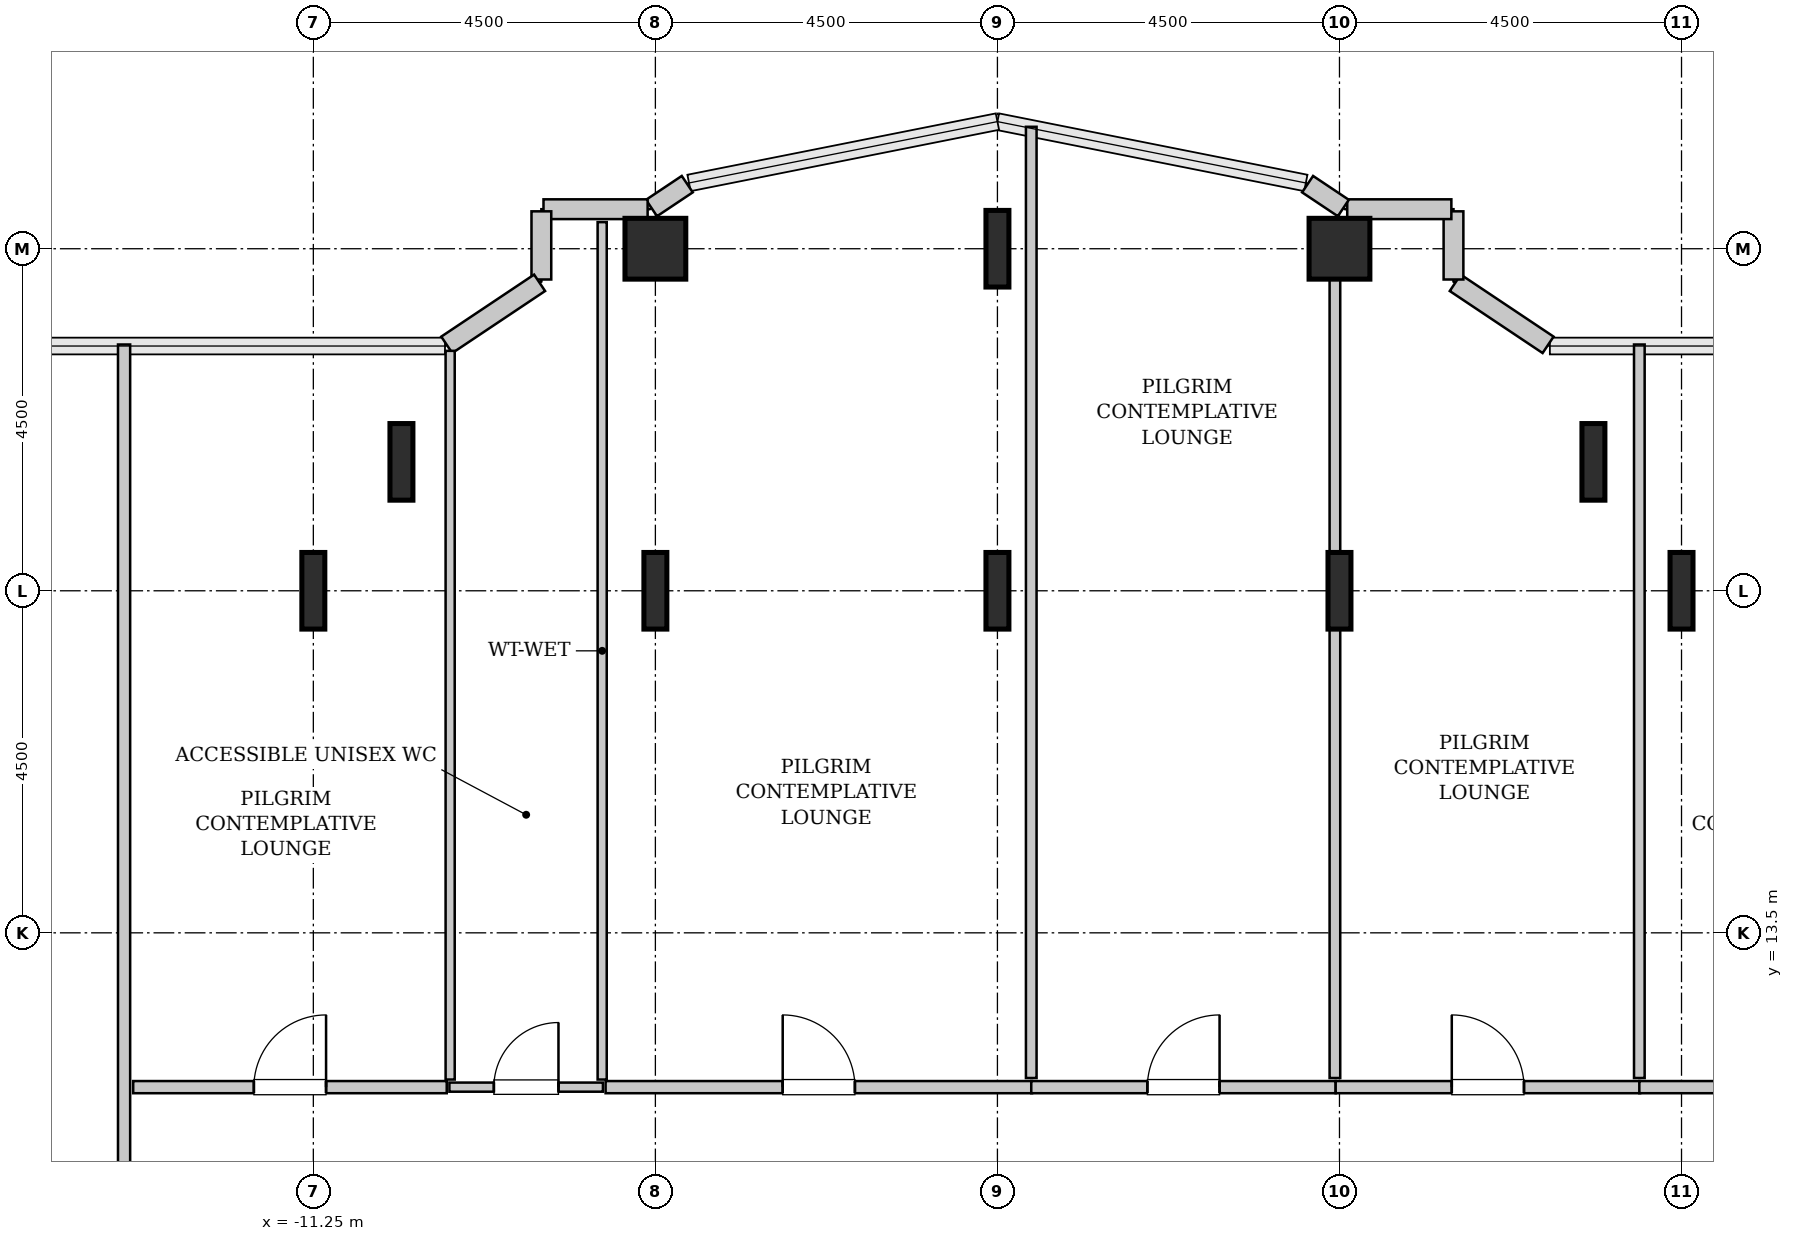
"""IFC4 building model, lengths in metres.
Left out: names, types, materials, properties, quantities, classifications, styles, units other than length and angle.
Written with IfcOpenShell. Run it as: python <this file> out.ifc"""

import sys

from ifc_helpers import new_model, si_unit, direction, frame, frame_2d, origin, origin_2d, place, context, subcontext, project, spatial, rectangle, hollow_rectangle, i_section, extrude, source, transform, mapped, element, fill, save


model = new_model("IFC4")
c1 = context("Model", 3, precision=1e-05, world=origin(), true_north=direction((0.0, 1.0)))
c2 = subcontext(c1, "Body", "Model", "MODEL_VIEW")
j1 = project(units=[si_unit("LENGTHUNIT", "METRE"), si_unit("PLANEANGLEUNIT", "RADIAN")], contexts=[c1])
p1 = place(None, origin())
s1 = spatial("IfcSite", under=j1, at=p1, CompositionType="ELEMENT")
p2 = place(p1, origin())
s2 = spatial("IfcBuilding", under=s1, at=p2, CompositionType="ELEMENT")
p3 = place(p2, frame((0.0, 0.0, 121.2)))
s3 = spatial("IfcBuildingStorey", under=s2, at=p3, CompositionType="ELEMENT", Elevation=121.2)
m1 = source(origin(), c2, "Body", "SweptSolid", [
    extrude(i_section(OverallWidth=0.302, OverallDepth=1.008, WebThickness=0.021, FlangeThickness=0.04, FilletRadius=0.03, at=origin_2d()), origin(), (0.0, 0.0, 1.0), 3.8),
])
for number, where, z_axis, x_axis in (
    (1, (-11.25, 18.0, 0.0), (0.0, 0.0, 1.0), (1.0, 0.0, 0.0)),
    (2, (-10.091, 19.696, 0.0), (0.0, 0.0, 1.0), (1.0, 0.0, 0.0)),
    (3, (-6.75, 18.0, 0.0), (0.0, 0.0, 1.0), (1.0, 0.0, 0.0)),
):
    element("IfcColumn", number, at=place(p3, frame(where, z_axis=z_axis, x_axis=x_axis)), inside=s3, PredefinedType="COLUMN", context=c2, shape_type="MappedRepresentation", body=[
        mapped(m1, transform((0.0, 0.0, 0.0), x_axis=(1.0, 0.0, 0.0), y_axis=(0.0, 1.0, 0.0), z_axis=(0.0, 0.0, 1.0), scale=1.0)),
    ])
m2 = source(origin(), c2, "Body", "SweptSolid", [
    extrude(hollow_rectangle(XDim=0.8, YDim=0.8, WallThickness=0.04, InnerFilletRadius=0.04, OuterFilletRadius=0.08, at=origin_2d()), origin(), (0.0, 0.0, 1.0), 3.8),
])
p4 = place(p3, frame((-6.75, 22.5, 0.0), z_axis=(0.0, 0.0, 1.0), x_axis=(1.0, 0.0, 0.0)))
e4 = element("IfcColumn", 4, at=p4, inside=s3, PredefinedType="COLUMN", context=c2, shape_type="MappedRepresentation", body=[
    mapped(m2, transform((0.0, 0.0, 0.0), x_axis=(1.0, 0.0, 0.0), y_axis=(0.0, 1.0, 0.0), z_axis=(0.0, 0.0, 1.0), scale=1.0)),
])
for number, where, z_axis, x_axis in (
    (5, (-2.25, 18.0, 0.0), (0.0, 0.0, 1.0), (1.0, 0.0, 0.0)),
    (6, (-2.25, 22.5, 0.0), (0.0, 0.0, 1.0), (1.0, 0.0, 0.0)),
    (7, (2.25, 18.0, 0.0), (0.0, 0.0, 1.0), (1.0, 0.0, 0.0)),
):
    element("IfcColumn", number, at=place(p3, frame(where, z_axis=z_axis, x_axis=x_axis)), inside=s3, PredefinedType="COLUMN", context=c2, shape_type="MappedRepresentation", body=[
        mapped(m1, transform((0.0, 0.0, 0.0), x_axis=(1.0, 0.0, 0.0), y_axis=(0.0, 1.0, 0.0), z_axis=(0.0, 0.0, 1.0), scale=1.0)),
    ])
p5 = place(p3, frame((2.25, 22.5, 0.0), z_axis=(0.0, 0.0, 1.0), x_axis=(1.0, 0.0, 0.0)))
e8 = element("IfcColumn", 8, at=p5, inside=s3, PredefinedType="COLUMN", context=c2, shape_type="MappedRepresentation", body=[
    mapped(m2, transform((0.0, 0.0, 0.0), x_axis=(1.0, 0.0, 0.0), y_axis=(0.0, 1.0, 0.0), z_axis=(0.0, 0.0, 1.0), scale=1.0)),
])
for number, where, z_axis, x_axis in (
    (9, (5.591, 19.696, 0.0), (0.0, 0.0, 1.0), (1.0, 0.0, 0.0)),
    (10, (6.75, 18.0, 0.0), (0.0, 0.0, 1.0), (1.0, 0.0, 0.0)),
):
    element("IfcColumn", number, at=place(p3, frame(where, z_axis=z_axis, x_axis=x_axis)), inside=s3, PredefinedType="COLUMN", context=c2, shape_type="MappedRepresentation", body=[
        mapped(m1, transform((0.0, 0.0, 0.0), x_axis=(1.0, 0.0, 0.0), y_axis=(0.0, 1.0, 0.0), z_axis=(0.0, 0.0, 1.0), scale=1.0)),
    ])
m3 = source(origin(), c2, "Body", "SweptSolid", [
    extrude(rectangle(XDim=1.469, YDim=0.26, at=frame_2d((0.734, 0.0))), origin(), (0.0, 0.0, 1.0), 3.55),
])
p6 = place(p3, frame((4.995, 21.236, 0.0), z_axis=(0.0, 0.0, 1.0), x_axis=(-0.831461760506, 0.555581983884, 0.0)))
e11 = element("IfcWall", 11, at=p6, inside=s3, PredefinedType="SOLIDWALL", context=c2, shape_type="MappedRepresentation", body=[
    mapped(m3, transform((0.0, 0.0, 0.0), x_axis=(1.0, 0.0, 0.0), y_axis=(0.0, 1.0, 0.0), z_axis=(0.0, 0.0, 1.0), scale=1.0)),
])
m4 = source(origin(), c2, "Body", "SweptSolid", [
    extrude(rectangle(XDim=0.897, YDim=0.26, at=frame_2d((0.448, 0.0))), origin(), (0.0, 0.0, 1.0), 3.55),
])
p7 = place(p3, frame((3.75, 22.095, 0.0), z_axis=(0.0, 0.0, 1.0), x_axis=(0.0, 1.0, 0.0)))
e12 = element("IfcWall", 12, at=p7, inside=s3, PredefinedType="SOLIDWALL", context=c2, shape_type="MappedRepresentation", body=[
    mapped(m4, transform((0.0, 0.0, 0.0), x_axis=(1.0, 0.0, 0.0), y_axis=(0.0, 1.0, 0.0), z_axis=(0.0, 0.0, 1.0), scale=1.0)),
])
m5 = source(origin(), c2, "Body", "SweptSolid", [
    extrude(rectangle(XDim=1.37, YDim=0.26, at=frame_2d((0.685, 0.0))), origin(), (0.0, 0.0, 1.0), 3.55),
])
p8 = place(p3, frame((3.722, 23.02, 0.0), z_axis=(0.0, 0.0, 1.0), x_axis=(-1.0, 0.0, 0.0)))
e13 = element("IfcWall", 13, at=p8, inside=s3, PredefinedType="SOLIDWALL", context=c2, shape_type="MappedRepresentation", body=[
    mapped(m5, transform((0.0, 0.0, 0.0), x_axis=(1.0, 0.0, 0.0), y_axis=(0.0, 1.0, 0.0), z_axis=(0.0, 0.0, 1.0), scale=1.0)),
])
m6 = source(origin(), c2, "Body", "SweptSolid", [
    extrude(rectangle(XDim=0.565, YDim=0.26, at=frame_2d((0.283, 0.0))), origin(), (0.0, 0.0, 1.0), 3.55),
])
for number, where, z_axis, x_axis in (
    (14, (2.301, 23.036, 0.0), (0.0, 0.0, 1.0), (-0.832, 0.555, 0.0)),
    (15, (-6.331, 23.35, 0.0), (0.0, 0.0, 1.0), (-0.832, -0.555, 0.0)),
):
    element("IfcWall", number, at=place(p3, frame(where, z_axis=z_axis, x_axis=x_axis)), inside=s3, PredefinedType="SOLIDWALL", context=c2, shape_type="MappedRepresentation", body=[
        mapped(m6, transform((0.0, 0.0, 0.0), x_axis=(1.0, 0.0, 0.0), y_axis=(0.0, 1.0, 0.0), z_axis=(0.0, 0.0, 1.0), scale=1.0)),
    ])
p9 = place(p3, frame((-6.852, 23.02, 0.0), z_axis=(0.0, 0.0, 1.0), x_axis=(-1.0, 0.0, 0.0)))
e16 = element("IfcWall", 16, at=p9, inside=s3, PredefinedType="SOLIDWALL", context=c2, shape_type="MappedRepresentation", body=[
    mapped(m5, transform((0.0, 0.0, 0.0), x_axis=(1.0, 0.0, 0.0), y_axis=(0.0, 1.0, 0.0), z_axis=(0.0, 0.0, 1.0), scale=1.0)),
])
p10 = place(p3, frame((-8.25, 22.992, 0.0), z_axis=(0.0, 0.0, 1.0), x_axis=(0.0, -1.0, 0.0)))
e17 = element("IfcWall", 17, at=p10, inside=s3, PredefinedType="SOLIDWALL", context=c2, shape_type="MappedRepresentation", body=[
    mapped(m4, transform((0.0, 0.0, 0.0), x_axis=(1.0, 0.0, 0.0), y_axis=(0.0, 1.0, 0.0), z_axis=(0.0, 0.0, 1.0), scale=1.0)),
])
p11 = place(p3, frame((-8.273, 22.052, 0.0), z_axis=(0.0, 0.0, 1.0), x_axis=(-0.831461760506, -0.555581983884, 0.0)))
e18 = element("IfcWall", 18, at=p11, inside=s3, PredefinedType="SOLIDWALL", context=c2, shape_type="MappedRepresentation", body=[
    mapped(m3, transform((0.0, 0.0, 0.0), x_axis=(1.0, 0.0, 0.0), y_axis=(0.0, 1.0, 0.0), z_axis=(0.0, 0.0, 1.0), scale=1.0)),
])
m7 = source(origin(), c2, "Body", "SweptSolid", [
    extrude(rectangle(XDim=2.02, YDim=0.12, at=frame_2d((1.01, 0.0))), origin(), (0.0, 0.0, 1.0), 3.535),
])
p12 = place(p3, frame((-9.46, 11.47, 0.0), z_axis=(0.0, 0.0, 1.0), x_axis=(1.0, 0.0, 0.0)))
e19 = element("IfcWall", 19, at=p12, inside=s3, PredefinedType="PLUMBINGWALL", context=c2, shape_type="MappedRepresentation", body=[
    mapped(m7, transform((0.0, 0.0, 0.0), x_axis=(1.0, 0.0, 0.0), y_axis=(0.0, 1.0, 0.0), z_axis=(0.0, 0.0, 1.0), scale=1.0)),
])
p13 = place(p12, frame((0.585, 0.0, 0.0)))
e20 = element("IfcOpeningElement", 20, at=p13, cuts=e19, PredefinedType="OPENING", context=c2, shape_type="SweptSolid", body=[
    extrude(rectangle(XDim=0.85, YDim=2.1, at=frame_2d((0.425, 1.05))), frame((0.0, 0.07, 0.0), z_axis=(0.0, -1.0, 0.0), x_axis=(1.0, 0.0, 0.0)), (0.0, 0.0, 1.0), 0.14),
])
m8 = source(origin(), c2, "Body", "SweptSolid", [
    extrude(rectangle(XDim=11.28, YDim=0.12, at=frame_2d((5.64, 0.0))), origin(), (0.0, 0.0, 1.0), 3.535),
])
p14 = place(p3, frame((-7.45, 11.57, 0.0), z_axis=(0.0, 0.0, 1.0), x_axis=(0.0, 1.0, 0.0)))
e21 = element("IfcWall", 21, at=p14, inside=s3, PredefinedType="PLUMBINGWALL", context=c2, shape_type="MappedRepresentation", body=[
    mapped(m8, transform((0.0, 0.0, 0.0), x_axis=(1.0, 0.0, 0.0), y_axis=(0.0, 1.0, 0.0), z_axis=(0.0, 0.0, 1.0), scale=1.0)),
])
m9 = source(origin(), c2, "Body", "SweptSolid", [
    extrude(rectangle(XDim=9.587, YDim=0.12, at=frame_2d((4.793, 0.0))), origin(), (0.0, 0.0, 1.0), 3.535),
])
p15 = place(p3, frame((-9.45, 11.57, 0.0), z_axis=(0.0, 0.0, 1.0), x_axis=(0.0, 1.0, 0.0)))
e22 = element("IfcWall", 22, at=p15, inside=s3, PredefinedType="PLUMBINGWALL", context=c2, shape_type="MappedRepresentation", body=[
    mapped(m9, transform((0.0, 0.0, 0.0), x_axis=(1.0, 0.0, 0.0), y_axis=(0.0, 1.0, 0.0), z_axis=(0.0, 0.0, 1.0), scale=1.0)),
])
m10 = source(origin(), c2, "Body", "SweptSolid", [
    extrude(rectangle(XDim=12.745, YDim=0.16, at=frame_2d((6.373, 0.0))), origin(), (0.0, 0.0, 1.0), 3.535),
])
p16 = place(p3, frame((-13.74, 8.495, 0.0), z_axis=(0.0, 0.0, 1.0), x_axis=(0.0, 1.0, 0.0)))
e23 = element("IfcWall", 23, at=p16, inside=s3, PredefinedType="PARTITIONING", context=c2, shape_type="MappedRepresentation", body=[
    mapped(m10, transform((0.0, 0.0, 0.0), x_axis=(1.0, 0.0, 0.0), y_axis=(0.0, 1.0, 0.0), z_axis=(0.0, 0.0, 1.0), scale=1.0)),
])
p17 = place(p16, frame((1.032, 0.0, 0.0)))
e24 = element("IfcOpeningElement", 24, at=p17, cuts=e23, PredefinedType="OPENING", context=c2, shape_type="SweptSolid", body=[
    extrude(rectangle(XDim=0.95, YDim=2.1, at=frame_2d((0.475, 1.05))), frame((0.0, 0.09, 0.0), z_axis=(0.0, -1.0, 0.0), x_axis=(1.0, 0.0, 0.0)), (0.0, 0.0, 1.0), 0.18),
])
m11 = source(origin(), c2, "Body", "SweptSolid", [
    extrude(rectangle(XDim=4.125, YDim=0.16, at=frame_2d((2.062, 0.0))), origin(), (0.0, 0.0, 1.0), 3.535),
])
p18 = place(p3, frame((-13.62, 11.47, 0.0), z_axis=(0.0, 0.0, 1.0), x_axis=(1.0, 0.0, 0.0)))
e25 = element("IfcWall", 25, at=p18, inside=s3, PredefinedType="PARTITIONING", context=c2, shape_type="MappedRepresentation", body=[
    mapped(m11, transform((0.0, 0.0, 0.0), x_axis=(1.0, 0.0, 0.0), y_axis=(0.0, 1.0, 0.0), z_axis=(0.0, 0.0, 1.0), scale=1.0)),
])
p19 = place(p18, frame((1.587, 0.0, 0.0)))
e26 = element("IfcOpeningElement", 26, at=p19, cuts=e25, PredefinedType="OPENING", context=c2, shape_type="SweptSolid", body=[
    extrude(rectangle(XDim=0.95, YDim=2.1, at=frame_2d((0.475, 1.05))), frame((0.0, 0.09, 0.0), z_axis=(0.0, -1.0, 0.0), x_axis=(1.0, 0.0, 0.0)), (0.0, 0.0, 1.0), 0.18),
])
m12 = source(origin(), c2, "Body", "SweptSolid", [
    extrude(rectangle(XDim=5.61, YDim=0.16, at=frame_2d((2.805, 0.0))), origin(), (0.0, 0.0, 1.0), 3.535),
])
p20 = place(p3, frame((-7.405, 11.47, 0.0), z_axis=(0.0, 0.0, 1.0), x_axis=(1.0, 0.0, 0.0)))
e27 = element("IfcWall", 27, at=p20, inside=s3, PredefinedType="PARTITIONING", context=c2, shape_type="MappedRepresentation", body=[
    mapped(m12, transform((0.0, 0.0, 0.0), x_axis=(1.0, 0.0, 0.0), y_axis=(0.0, 1.0, 0.0), z_axis=(0.0, 0.0, 1.0), scale=1.0)),
])
p21 = place(p20, frame((2.33, 0.0, 0.0)))
e28 = element("IfcOpeningElement", 28, at=p21, cuts=e27, PredefinedType="OPENING", context=c2, shape_type="SweptSolid", body=[
    extrude(rectangle(XDim=0.95, YDim=2.1, at=frame_2d((0.475, 1.05))), frame((0.0, 0.09, 0.0), z_axis=(0.0, -1.0, 0.0), x_axis=(1.0, 0.0, 0.0)), (0.0, 0.0, 1.0), 0.18),
])
m13 = source(origin(), c2, "Body", "SweptSolid", [
    extrude(rectangle(XDim=12.514, YDim=0.14, at=frame_2d((6.257, 0.0))), origin(), (0.0, 0.0, 1.0), 2.875),
])
p22 = place(p3, frame((-1.805, 11.59, 0.0), z_axis=(0.0, 0.0, 1.0), x_axis=(0.0, 1.0, 0.0)))
e29 = element("IfcWall", 29, at=p22, inside=s3, PredefinedType="PARTITIONING", context=c2, shape_type="MappedRepresentation", body=[
    mapped(m13, transform((0.0, 0.0, 0.0), x_axis=(1.0, 0.0, 0.0), y_axis=(0.0, 1.0, 0.0), z_axis=(0.0, 0.0, 1.0), scale=1.0)),
])
m14 = source(origin(), c2, "Body", "SweptSolid", [
    extrude(rectangle(XDim=4.005, YDim=0.16, at=frame_2d((2.002, 0.0))), origin(), (0.0, 0.0, 1.0), 3.535),
])
p23 = place(p3, frame((-1.805, 11.47, 0.0), z_axis=(0.0, 0.0, 1.0), x_axis=(1.0, 0.0, 0.0)))
e30 = element("IfcWall", 30, at=p23, inside=s3, PredefinedType="PARTITIONING", context=c2, shape_type="MappedRepresentation", body=[
    mapped(m14, transform((0.0, 0.0, 0.0), x_axis=(1.0, 0.0, 0.0), y_axis=(0.0, 1.0, 0.0), z_axis=(0.0, 0.0, 1.0), scale=1.0)),
])
p24 = place(p23, frame((1.528, 0.0, 0.0)))
e31 = element("IfcOpeningElement", 31, at=p24, cuts=e30, PredefinedType="OPENING", context=c2, shape_type="SweptSolid", body=[
    extrude(rectangle(XDim=0.95, YDim=2.1, at=frame_2d((0.475, 1.05))), frame((0.0, 0.09, 0.0), z_axis=(0.0, -1.0, 0.0), x_axis=(1.0, 0.0, 0.0)), (0.0, 0.0, 1.0), 0.18),
])
m15 = source(origin(), c2, "Body", "SweptSolid", [
    extrude(rectangle(XDim=11.318, YDim=0.14, at=frame_2d((5.659, 0.0))), origin(), (0.0, 0.0, 1.0), 2.875),
])
p25 = place(p3, frame((2.19, 11.59, 0.0), z_axis=(0.0, 0.0, 1.0), x_axis=(0.0, 1.0, 0.0)))
e32 = element("IfcWall", 32, at=p25, inside=s3, PredefinedType="PARTITIONING", context=c2, shape_type="MappedRepresentation", body=[
    mapped(m15, transform((0.0, 0.0, 0.0), x_axis=(1.0, 0.0, 0.0), y_axis=(0.0, 1.0, 0.0), z_axis=(0.0, 0.0, 1.0), scale=1.0)),
])
m16 = source(origin(), c2, "Body", "SweptSolid", [
    extrude(rectangle(XDim=4.005, YDim=0.16, at=frame_2d((2.002, 0.0))), origin(), (0.0, 0.0, 1.0), 3.535),
])
p26 = place(p3, frame((2.2, 11.47, 0.0), z_axis=(0.0, 0.0, 1.0), x_axis=(1.0, 0.0, 0.0)))
e33 = element("IfcWall", 33, at=p26, inside=s3, PredefinedType="PARTITIONING", context=c2, shape_type="MappedRepresentation", body=[
    mapped(m16, transform((0.0, 0.0, 0.0), x_axis=(1.0, 0.0, 0.0), y_axis=(0.0, 1.0, 0.0), z_axis=(0.0, 0.0, 1.0), scale=1.0)),
])
p27 = place(p26, frame((1.528, 0.0, 0.0)))
e34 = element("IfcOpeningElement", 34, at=p27, cuts=e33, PredefinedType="OPENING", context=c2, shape_type="SweptSolid", body=[
    extrude(rectangle(XDim=0.95, YDim=2.1, at=frame_2d((0.475, 1.05))), frame((0.0, 0.09, 0.0), z_axis=(0.0, -1.0, 0.0), x_axis=(1.0, 0.0, 0.0)), (0.0, 0.0, 1.0), 0.18),
])
m17 = source(origin(), c2, "Body", "SweptSolid", [
    extrude(rectangle(XDim=9.65, YDim=0.14, at=frame_2d((4.825, 0.0))), origin(), (0.0, 0.0, 1.0), 3.535),
])
p28 = place(p3, frame((6.195, 11.59, 0.0), z_axis=(0.0, 0.0, 1.0), x_axis=(0.0, 1.0, 0.0)))
e35 = element("IfcWall", 35, at=p28, inside=s3, PredefinedType="PARTITIONING", context=c2, shape_type="MappedRepresentation", body=[
    mapped(m17, transform((0.0, 0.0, 0.0), x_axis=(1.0, 0.0, 0.0), y_axis=(0.0, 1.0, 0.0), z_axis=(0.0, 0.0, 1.0), scale=1.0)),
])
m18 = source(origin(), c2, "Body", "SweptSolid", [
    extrude(rectangle(XDim=3.765, YDim=0.16, at=frame_2d((1.882, 0.0))), origin(), (0.0, 0.0, 1.0), 3.535),
])
p29 = place(p3, frame((6.195, 11.47, 0.0), z_axis=(0.0, 0.0, 1.0), x_axis=(1.0, 0.0, 0.0)))
e36 = element("IfcWall", 36, at=p29, inside=s3, PredefinedType="PARTITIONING", context=c2, shape_type="MappedRepresentation", body=[
    mapped(m18, transform((0.0, 0.0, 0.0), x_axis=(1.0, 0.0, 0.0), y_axis=(0.0, 1.0, 0.0), z_axis=(0.0, 0.0, 1.0), scale=1.0)),
])
p30 = place(p29, frame((1.407, 0.0, 0.0)))
e37 = element("IfcOpeningElement", 37, at=p30, cuts=e36, PredefinedType="OPENING", context=c2, shape_type="SweptSolid", body=[
    extrude(rectangle(XDim=0.95, YDim=2.1, at=frame_2d((0.475, 1.05))), frame((0.0, 0.09, 0.0), z_axis=(0.0, -1.0, 0.0), x_axis=(1.0, 0.0, 0.0)), (0.0, 0.0, 1.0), 0.18),
])
m19 = source(origin(), c2, "Body", "SweptSolid", [
    extrude(rectangle(XDim=0.85, YDim=2.1, at=frame_2d((0.425, 1.05))), frame((0.0, 0.025, 0.0), z_axis=(0.0, -1.0, 0.0), x_axis=(1.0, 0.0, 0.0)), (0.0, 0.0, 1.0), 0.05),
])
p31 = place(p13, origin())
e38 = element("IfcDoor", 38, at=p31, inside=s3, OperationType="SINGLE_SWING_RIGHT", PredefinedType="DOOR", context=c2, shape_type="MappedRepresentation", body=[
    mapped(m19, transform((0.0, 0.0, 0.0), x_axis=(1.0, 0.0, 0.0), y_axis=(0.0, 1.0, 0.0), z_axis=(0.0, 0.0, 1.0), scale=1.0)),
])
fill(e20, e38)
m20 = source(origin(), c2, "Body", "SweptSolid", [
    extrude(rectangle(XDim=0.95, YDim=2.1, at=frame_2d((0.475, 1.05))), frame((0.0, 0.025, 0.0), z_axis=(0.0, -1.0, 0.0), x_axis=(1.0, 0.0, 0.0)), (0.0, 0.0, 1.0), 0.05),
])
p32 = place(p19, origin())
e39 = element("IfcDoor", 39, at=p32, inside=s3, OperationType="SINGLE_SWING_RIGHT", PredefinedType="DOOR", context=c2, shape_type="MappedRepresentation", body=[
    mapped(m20, transform((0.0, 0.0, 0.0), x_axis=(1.0, 0.0, 0.0), y_axis=(0.0, 1.0, 0.0), z_axis=(0.0, 0.0, 1.0), scale=1.0)),
])
fill(e26, e39)
p33 = place(p21, origin())
e40 = element("IfcDoor", 40, at=p33, inside=s3, OperationType="SINGLE_SWING_LEFT", PredefinedType="DOOR", context=c2, shape_type="MappedRepresentation", body=[
    mapped(m20, transform((0.0, 0.0, 0.0), x_axis=(1.0, 0.0, 0.0), y_axis=(0.0, 1.0, 0.0), z_axis=(0.0, 0.0, 1.0), scale=1.0)),
])
fill(e28, e40)
p34 = place(p24, origin())
e41 = element("IfcDoor", 41, at=p34, inside=s3, OperationType="SINGLE_SWING_RIGHT", PredefinedType="DOOR", context=c2, shape_type="MappedRepresentation", body=[
    mapped(m20, transform((0.0, 0.0, 0.0), x_axis=(1.0, 0.0, 0.0), y_axis=(0.0, 1.0, 0.0), z_axis=(0.0, 0.0, 1.0), scale=1.0)),
])
fill(e31, e41)
p35 = place(p27, origin())
e42 = element("IfcDoor", 42, at=p35, inside=s3, OperationType="SINGLE_SWING_LEFT", PredefinedType="DOOR", context=c2, shape_type="MappedRepresentation", body=[
    mapped(m20, transform((0.0, 0.0, 0.0), x_axis=(1.0, 0.0, 0.0), y_axis=(0.0, 1.0, 0.0), z_axis=(0.0, 0.0, 1.0), scale=1.0)),
])
fill(e34, e42)
save(model, sys.argv[1])
